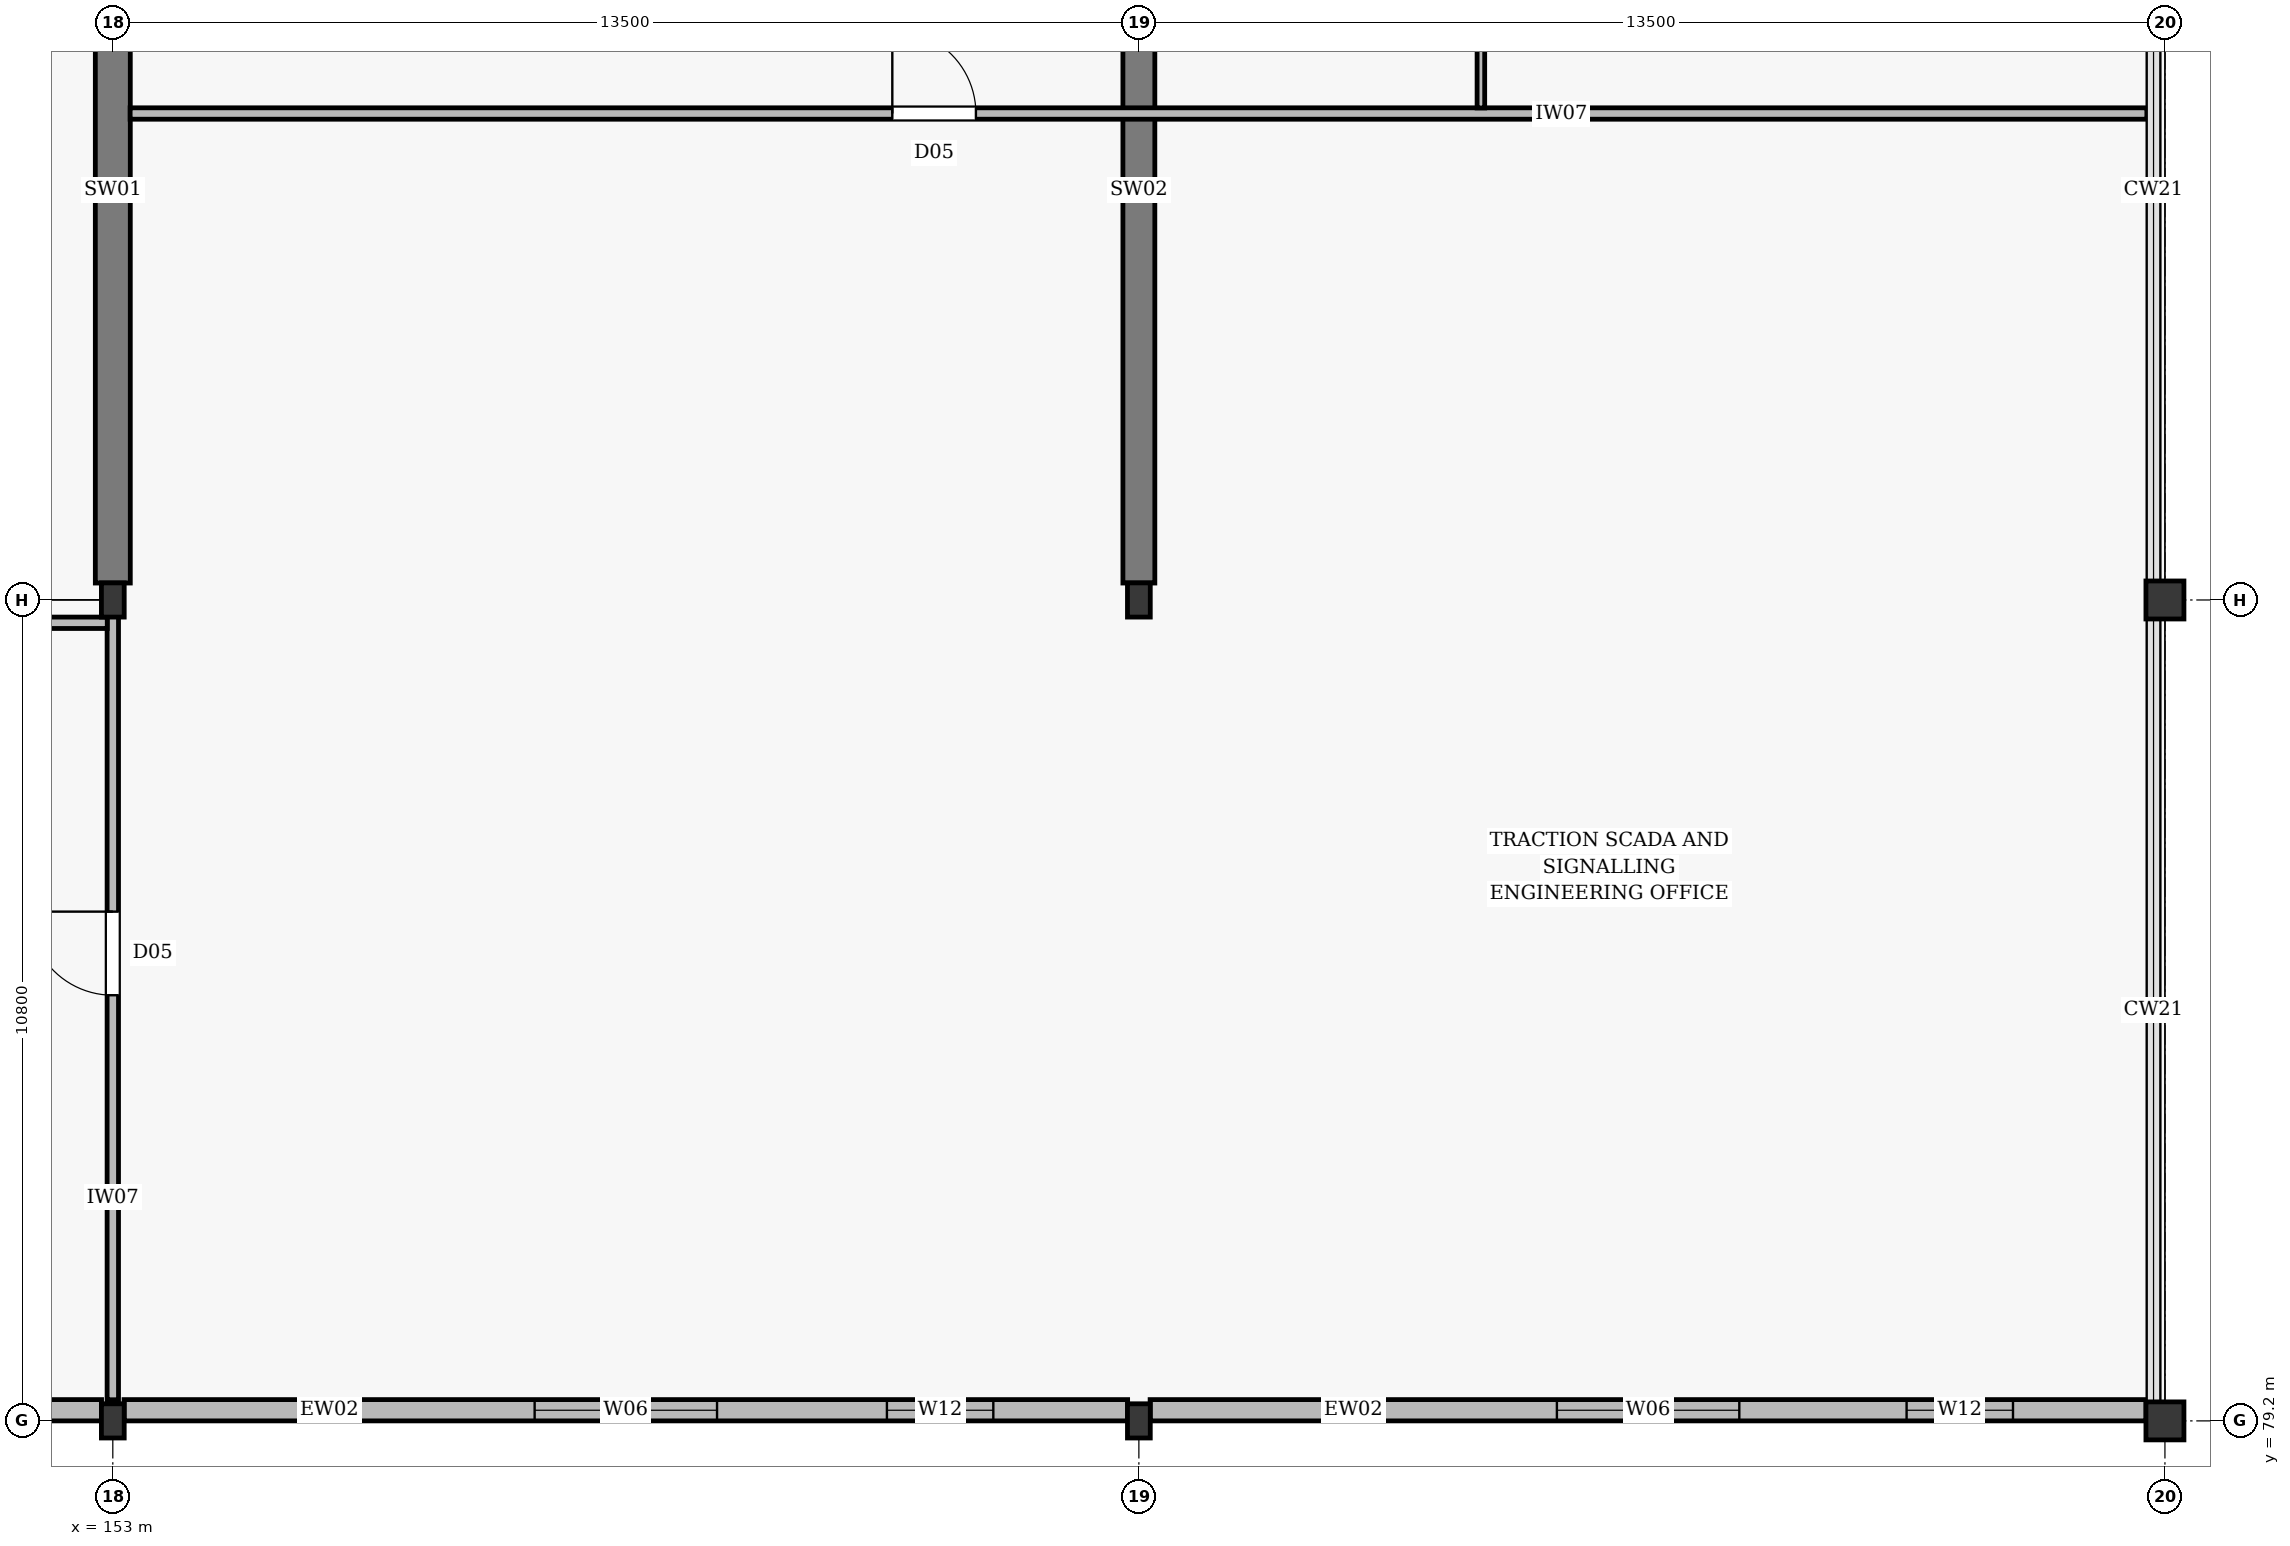
"""IFC4 building model, lengths in metres.
Left out: names, types, materials, properties, quantities, classifications, styles, units other than length and angle.
Written with IfcOpenShell. Run it as: python <this file> out.ifc"""

import sys

from ifc_helpers import new_model, si_unit, direction, frame, frame_2d, origin, origin_2d, place, context, subcontext, project, spatial, rectangle, i_section, extrude, element, fill, save


model = new_model("IFC4")
c1 = context("Model", 3, precision=1e-05, world=origin(), true_north=direction((0.0, 1.0)))
c2 = subcontext(c1, "Body", "Model", "MODEL_VIEW")
j1 = project(units=[si_unit("LENGTHUNIT", "METRE"), si_unit("PLANEANGLEUNIT", "RADIAN")], contexts=[c1])
p1 = place(None, origin())
s1 = spatial("IfcSite", under=j1, at=p1, CompositionType="ELEMENT")
p2 = place(p1, origin())
s2 = spatial("IfcBuilding", under=s1, at=p2, CompositionType="ELEMENT")
p3 = place(p2, frame((0.0, 0.0, 17.4)))
s3 = spatial("IfcBuildingStorey", under=s2, at=p3, CompositionType="ELEMENT", Elevation=17.4)
for number, where, z_axis, x_axis in (
    (1, (153.0, 79.2, 0.0), (0.0, 0.0, 1.0), (1.0, 0.0, 0.0)),
    (2, (153.0, 90.0, 0.0), (0.0, 0.0, 1.0), (1.0, 0.0, 0.0)),
    (3, (166.5, 79.2, 0.0), (0.0, 0.0, 1.0), (1.0, 0.0, 0.0)),
    (4, (166.5, 90.0, 0.0), (0.0, 0.0, 1.0), (1.0, 0.0, 0.0)),
):
    element("IfcColumn", number, at=place(p3, frame(where, z_axis=z_axis, x_axis=x_axis)), inside=s3, PredefinedType="COLUMN", context=c2, shape_type="SweptSolid", body=[
        extrude(i_section(OverallWidth=0.3, OverallDepth=0.45, WebThickness=0.014, FlangeThickness=0.026, at=origin_2d()), origin(), (0.0, 0.0, 1.0), 3.9),
    ])
for number, where, z_axis, x_axis in (
    (5, (180.0, 79.2, 0.0), (0.0, 0.0, 1.0), (1.0, 0.0, 0.0)),
    (6, (180.0, 90.0, 0.0), (0.0, 0.0, 1.0), (1.0, 0.0, 0.0)),
):
    element("IfcColumn", number, at=place(p3, frame(where, z_axis=z_axis, x_axis=x_axis)), inside=s3, PredefinedType="COLUMN", context=c2, shape_type="SweptSolid", body=[
        extrude(rectangle(XDim=0.5, YDim=0.5, at=origin_2d()), origin(), (0.0, 0.0, 1.0), 3.9),
    ])
p4 = place(p3, frame((153.0, 90.223, 0.0), z_axis=(0.0, 0.0, 1.0), x_axis=(0.0, 1.0, 0.0)))
e7 = element("IfcWall", 7, at=p4, inside=s3, PredefinedType="SHEAR", context=c2, shape_type="SweptSolid", body=[
    extrude(rectangle(XDim=10.354, YDim=0.46, at=frame_2d((5.177, 0.0))), origin(), (0.0, 0.0, 1.0), 3.68),
])
p5 = place(p3, frame((166.5, 90.223, 0.0), z_axis=(0.0, 0.0, 1.0), x_axis=(0.0, 1.0, 0.0)))
e8 = element("IfcWall", 8, at=p5, inside=s3, PredefinedType="SHEAR", context=c2, shape_type="SweptSolid", body=[
    extrude(rectangle(XDim=10.354, YDim=0.42, at=frame_2d((5.177, 0.0))), origin(), (0.0, 0.0, 1.0), 3.68),
])
p6 = place(p3, frame((140.148, 79.34, 0.0), z_axis=(0.0, 0.0, 1.0), x_axis=(1.0, 0.0, 0.0)))
e9 = element("IfcWall", 9, at=p6, inside=s3, PredefinedType="STANDARD", context=c2, shape_type="SweptSolid", body=[
    extrude(rectangle(XDim=12.704, YDim=0.28, at=frame_2d((6.352, 0.0))), origin(), (0.0, 0.0, 1.0), 3.12),
])
p7 = place(p6, frame((5.152, 0.0, 0.48)))
e10 = element("IfcOpeningElement", 10, at=p7, cuts=e9, PredefinedType="OPENING", context=c2, shape_type="SweptSolid", body=[
    extrude(rectangle(XDim=2.4, YDim=2.4, at=frame_2d((1.2, 1.2))), frame((0.0, 0.152, 0.0), z_axis=(0.0, -1.0, 0.0), x_axis=(1.0, 0.0, 0.0)), (0.0, 0.0, 1.0), 0.304),
])
p8 = place(p6, frame((9.62, 0.0, 1.05)))
e11 = element("IfcOpeningElement", 11, at=p8, cuts=e9, PredefinedType="OPENING", context=c2, shape_type="SweptSolid", body=[
    extrude(rectangle(XDim=1.4, YDim=1.8, at=frame_2d((0.7, 0.9))), frame((0.0, 0.152, 0.0), z_axis=(0.0, -1.0, 0.0), x_axis=(1.0, 0.0, 0.0)), (0.0, 0.0, 1.0), 0.304),
])
p9 = place(p3, frame((153.148, 79.34, 0.0), z_axis=(0.0, 0.0, 1.0), x_axis=(1.0, 0.0, 0.0)))
e12 = element("IfcWall", 12, at=p9, inside=s3, PredefinedType="STANDARD", context=c2, shape_type="SweptSolid", body=[
    extrude(rectangle(XDim=13.204, YDim=0.28, at=frame_2d((6.602, 0.0))), origin(), (0.0, 0.0, 1.0), 3.12),
])
p10 = place(p9, frame((5.402, 0.0, 0.48)))
e13 = element("IfcOpeningElement", 13, at=p10, cuts=e12, PredefinedType="OPENING", context=c2, shape_type="SweptSolid", body=[
    extrude(rectangle(XDim=2.4, YDim=2.4, at=frame_2d((1.2, 1.2))), frame((0.0, 0.152, 0.0), z_axis=(0.0, -1.0, 0.0), x_axis=(1.0, 0.0, 0.0)), (0.0, 0.0, 1.0), 0.304),
])
p11 = place(p9, frame((10.037, 0.0, 1.05)))
e14 = element("IfcOpeningElement", 14, at=p11, cuts=e12, PredefinedType="OPENING", context=c2, shape_type="SweptSolid", body=[
    extrude(rectangle(XDim=1.4, YDim=1.8, at=frame_2d((0.7, 0.9))), frame((0.0, 0.152, 0.0), z_axis=(0.0, -1.0, 0.0), x_axis=(1.0, 0.0, 0.0)), (0.0, 0.0, 1.0), 0.304),
])
p12 = place(p3, frame((166.648, 79.34, 0.0), z_axis=(0.0, 0.0, 1.0), x_axis=(1.0, 0.0, 0.0)))
e15 = element("IfcWall", 15, at=p12, inside=s3, PredefinedType="STANDARD", context=c2, shape_type="SweptSolid", body=[
    extrude(rectangle(XDim=13.104, YDim=0.28, at=frame_2d((6.552, 0.0))), origin(), (0.0, 0.0, 1.0), 3.12),
])
p13 = place(p12, frame((5.352, 0.0, 0.48)))
e16 = element("IfcOpeningElement", 16, at=p13, cuts=e15, PredefinedType="OPENING", context=c2, shape_type="SweptSolid", body=[
    extrude(rectangle(XDim=2.4, YDim=2.4, at=frame_2d((1.2, 1.2))), frame((0.0, 0.152, 0.0), z_axis=(0.0, -1.0, 0.0), x_axis=(1.0, 0.0, 0.0)), (0.0, 0.0, 1.0), 0.304),
])
p14 = place(p12, frame((9.953, 0.0, 1.05)))
e17 = element("IfcOpeningElement", 17, at=p14, cuts=e15, PredefinedType="OPENING", context=c2, shape_type="SweptSolid", body=[
    extrude(rectangle(XDim=1.4, YDim=1.8, at=frame_2d((0.7, 0.9))), frame((0.0, 0.152, 0.0), z_axis=(0.0, -1.0, 0.0), x_axis=(1.0, 0.0, 0.0)), (0.0, 0.0, 1.0), 0.304),
])
p15 = place(p3, frame((153.0, 79.478, 0.0), z_axis=(0.0, 0.0, 1.0), x_axis=(0.0, 1.0, 0.0)))
e18 = element("IfcWall", 18, at=p15, inside=s3, PredefinedType="PARTITIONING", context=c2, shape_type="SweptSolid", body=[
    extrude(rectangle(XDim=10.522, YDim=0.15, at=frame_2d((5.261, 0.0))), origin(), (0.0, 0.0, 1.0), 3.12),
])
p16 = place(p15, frame((5.322, 0.0, 0.005)))
e19 = element("IfcOpeningElement", 19, at=p16, cuts=e18, PredefinedType="OPENING", context=c2, shape_type="SweptSolid", body=[
    extrude(rectangle(XDim=1.1, YDim=2.1, at=frame_2d((0.55, 1.05))), frame((0.0, 0.087, 0.0), z_axis=(0.0, -1.0, 0.0), x_axis=(1.0, 0.0, 0.0)), (0.0, 0.0, 1.0), 0.174),
])
p17 = place(p3, frame((153.228, 96.4, 0.0), z_axis=(0.0, 0.0, 1.0), x_axis=(1.0, 0.0, 0.0)))
e20 = element("IfcWall", 20, at=p17, inside=s3, PredefinedType="PARTITIONING", context=c2, shape_type="SweptSolid", body=[
    extrude(rectangle(XDim=26.534, YDim=0.15, at=frame_2d((13.267, 0.0))), origin(), (0.0, 0.0, 1.0), 3.31),
])
p18 = place(p17, frame((10.028, 0.0, 0.005)))
e21 = element("IfcOpeningElement", 21, at=p18, cuts=e20, PredefinedType="OPENING", context=c2, shape_type="SweptSolid", body=[
    extrude(rectangle(XDim=1.1, YDim=2.1, at=frame_2d((0.55, 1.05))), frame((0.0, 0.087, 0.0), z_axis=(0.0, -1.0, 0.0), x_axis=(1.0, 0.0, 0.0)), (0.0, 0.0, 1.0), 0.174),
])
p19 = place(p3, frame((128.308, 89.7, 0.0), z_axis=(0.0, 0.0, 1.0), x_axis=(1.0, 0.0, 0.0)))
e22 = element("IfcWall", 22, at=p19, inside=s3, PredefinedType="PARTITIONING", context=c2, shape_type="SweptSolid", body=[
    extrude(rectangle(XDim=24.619, YDim=0.15, at=frame_2d((12.31, 0.0))), origin(), (0.0, 0.0, 1.0), 3.12),
])
p20 = place(p19, frame((4.292, 0.0, 0.005)))
e23 = element("IfcOpeningElement", 23, at=p20, cuts=e22, PredefinedType="OPENING", context=c2, shape_type="SweptSolid", body=[
    extrude(rectangle(XDim=0.92, YDim=2.12, at=frame_2d((0.46, 1.06))), frame((0.0, 0.087, 0.0), z_axis=(0.0, -1.0, 0.0), x_axis=(1.0, 0.0, 0.0)), (0.0, 0.0, 1.0), 0.174),
])
p21 = place(p19, frame((12.492, 0.0, 0.005)))
e24 = element("IfcOpeningElement", 24, at=p21, cuts=e22, PredefinedType="OPENING", context=c2, shape_type="SweptSolid", body=[
    extrude(rectangle(XDim=1.05, YDim=2.15, at=frame_2d((0.525, 1.075))), frame((0.0, 0.087, 0.0), z_axis=(0.0, -1.0, 0.0), x_axis=(1.0, 0.0, 0.0)), (0.0, 0.0, 1.0), 0.174),
])
p22 = place(p19, frame((18.492, 0.0, 0.005)))
e25 = element("IfcOpeningElement", 25, at=p22, cuts=e22, PredefinedType="OPENING", context=c2, shape_type="SweptSolid", body=[
    extrude(rectangle(XDim=0.95, YDim=2.1, at=frame_2d((0.475, 1.05))), frame((0.0, 0.087, 0.0), z_axis=(0.0, -1.0, 0.0), x_axis=(1.0, 0.0, 0.0)), (0.0, 0.0, 1.0), 0.174),
])
p23 = place(p3, frame((171.0, 96.473, 0.0), z_axis=(0.0, 0.0, 1.0), x_axis=(0.0, 1.0, 0.0)))
e26 = element("IfcWall", 26, at=p23, inside=s3, PredefinedType="MOVABLE", context=c2, shape_type="SweptSolid", body=[
    extrude(rectangle(XDim=8.329, YDim=0.1, at=frame_2d((4.165, 0.0))), origin(), (0.0, 0.0, 1.0), 3.12),
])
p24 = place(p10, origin())
e27 = element("IfcWindow", 27, at=p24, inside=s3, PartitioningType="DOUBLE_PANEL_VERTICAL", PredefinedType="WINDOW", context=c2, shape_type="SweptSolid", body=[
    extrude(rectangle(XDim=2.4, YDim=2.4, at=frame_2d((1.2, 1.2))), frame((0.0, 0.03, 0.0), z_axis=(0.0, -1.0, 0.0), x_axis=(1.0, 0.0, 0.0)), (0.0, 0.0, 1.0), 0.06),
])
fill(e13, e27)
p25 = place(p11, origin())
e28 = element("IfcWindow", 28, at=p25, inside=s3, PartitioningType="DOUBLE_PANEL_VERTICAL", PredefinedType="WINDOW", context=c2, shape_type="SweptSolid", body=[
    extrude(rectangle(XDim=1.4, YDim=1.8, at=frame_2d((0.7, 0.9))), frame((0.0, 0.03, 0.0), z_axis=(0.0, -1.0, 0.0), x_axis=(1.0, 0.0, 0.0)), (0.0, 0.0, 1.0), 0.06),
])
fill(e14, e28)
p26 = place(p13, origin())
e29 = element("IfcWindow", 29, at=p26, inside=s3, PartitioningType="DOUBLE_PANEL_VERTICAL", PredefinedType="WINDOW", context=c2, shape_type="SweptSolid", body=[
    extrude(rectangle(XDim=2.4, YDim=2.4, at=frame_2d((1.2, 1.2))), frame((0.0, 0.03, 0.0), z_axis=(0.0, -1.0, 0.0), x_axis=(1.0, 0.0, 0.0)), (0.0, 0.0, 1.0), 0.06),
])
fill(e16, e29)
p27 = place(p14, origin())
e30 = element("IfcWindow", 30, at=p27, inside=s3, PartitioningType="DOUBLE_PANEL_VERTICAL", PredefinedType="WINDOW", context=c2, shape_type="SweptSolid", body=[
    extrude(rectangle(XDim=1.4, YDim=1.8, at=frame_2d((0.7, 0.9))), frame((0.0, 0.03, 0.0), z_axis=(0.0, -1.0, 0.0), x_axis=(1.0, 0.0, 0.0)), (0.0, 0.0, 1.0), 0.06),
])
fill(e17, e30)
p28 = place(p16, origin())
e31 = element("IfcDoor", 31, at=p28, inside=s3, OperationType="SINGLE_SWING_RIGHT", PredefinedType="DOOR", context=c2, shape_type="SweptSolid", body=[
    extrude(rectangle(XDim=1.1, YDim=2.1, at=frame_2d((0.55, 1.05))), frame((0.0, 0.025, 0.0), z_axis=(0.0, -1.0, 0.0), x_axis=(1.0, 0.0, 0.0)), (0.0, 0.0, 1.0), 0.05),
])
fill(e19, e31)
p29 = place(p18, origin())
e32 = element("IfcDoor", 32, at=p29, inside=s3, OperationType="SINGLE_SWING_LEFT", PredefinedType="DOOR", context=c2, shape_type="SweptSolid", body=[
    extrude(rectangle(XDim=1.1, YDim=2.1, at=frame_2d((0.55, 1.05))), frame((0.0, 0.025, 0.0), z_axis=(0.0, -1.0, 0.0), x_axis=(1.0, 0.0, 0.0)), (0.0, 0.0, 1.0), 0.05),
])
fill(e21, e32)
save(model, sys.argv[1])
